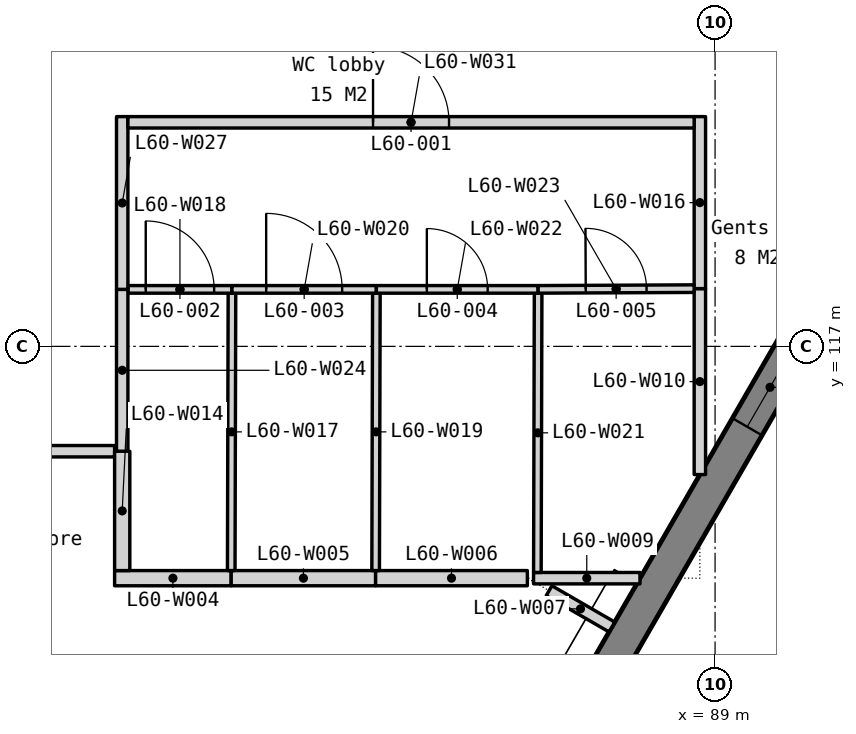
"""IFC4 building model, lengths in metres.
Left out: names, types, materials, properties, quantities, classifications, styles, units other than length and angle.
Written with IfcOpenShell. Run it as: python <this file> out.ifc"""

import sys

from ifc_helpers import new_model, si_unit, direction, frame, frame_2d, origin, place, context, subcontext, project, spatial, polyline, rectangle, outline, extrude, element, fill, save


model = new_model("IFC4")
c1 = context("Model", 3, precision=1e-05, world=origin(), true_north=direction((0.0, 1.0)))
c2 = subcontext(c1, "Body", "Model", "MODEL_VIEW")
j1 = project(units=[si_unit("LENGTHUNIT", "METRE"), si_unit("PLANEANGLEUNIT", "RADIAN")], contexts=[c1])
p1 = place(None, origin())
s1 = spatial("IfcSite", under=j1, at=p1, CompositionType="ELEMENT")
p2 = place(p1, origin())
s2 = spatial("IfcBuilding", under=s1, at=p2, CompositionType="ELEMENT")
p3 = place(p2, frame((0.0, 0.0, 246.5)))
s3 = spatial("IfcBuildingStorey", under=s2, at=p3, CompositionType="ELEMENT", Elevation=246.5)
p4 = place(p3, frame((80.905, 101.188, -0.15), z_axis=(0.0, 0.0, 1.0), x_axis=(0.500002536638, 0.866023939251, 0.0)))
e1 = element("IfcWall", 1, at=p4, inside=s3, PredefinedType="SOLIDWALL", context=c2, shape_type="SweptSolid", body=[
    extrude(outline(polyline([(36.972, 0.0), (36.972, 3.9), (0.0, 3.9), (0.0, 0.0), (36.972, 0.0)])), frame((0.0, 0.225, 0.0), z_axis=(0.0, -1.0, 0.0), x_axis=(1.0, 0.0, 0.0)), (0.0, 0.0, 1.0), 0.45),
])
p5 = place(p4, frame((0.744, 0.0, 0.95)))
e2 = element("IfcOpeningElement", 2, at=p5, cuts=e1, PredefinedType="OPENING", context=c2, shape_type="SweptSolid", body=[
    extrude(rectangle(XDim=1.2, YDim=2.2, at=frame_2d((0.6, 1.1))), frame((0.0, 0.235, 0.0), z_axis=(0.0, -1.0, 0.0), x_axis=(1.0, 0.0, 0.0)), (0.0, 0.0, 1.0), 0.47),
])
p6 = place(p4, frame((7.793, 0.0, 0.95)))
e3 = element("IfcOpeningElement", 3, at=p6, cuts=e1, PredefinedType="OPENING", context=c2, shape_type="SweptSolid", body=[
    extrude(rectangle(XDim=1.2, YDim=2.2, at=frame_2d((0.6, 1.1))), frame((0.0, 0.235, 0.0), z_axis=(0.0, -1.0, 0.0), x_axis=(1.0, 0.0, 0.0)), (0.0, 0.0, 1.0), 0.47),
])
p7 = place(p4, frame((9.493, 0.0, 0.95)))
e4 = element("IfcOpeningElement", 4, at=p7, cuts=e1, PredefinedType="OPENING", context=c2, shape_type="SweptSolid", body=[
    extrude(rectangle(XDim=1.2, YDim=2.2, at=frame_2d((0.6, 1.1))), frame((0.0, 0.235, 0.0), z_axis=(0.0, -1.0, 0.0), x_axis=(1.0, 0.0, 0.0)), (0.0, 0.0, 1.0), 0.47),
])
p8 = place(p4, frame((17.036, 0.0, 0.95)))
e5 = element("IfcOpeningElement", 5, at=p8, cuts=e1, PredefinedType="OPENING", context=c2, shape_type="SweptSolid", body=[
    extrude(rectangle(XDim=1.2, YDim=2.2, at=frame_2d((0.6, 1.1))), frame((0.0, 0.235, 0.0), z_axis=(0.0, -1.0, 0.0), x_axis=(1.0, 0.0, 0.0)), (0.0, 0.0, 1.0), 0.47),
])
p9 = place(p4, frame((18.736, 0.0, 0.95)))
e6 = element("IfcOpeningElement", 6, at=p9, cuts=e1, PredefinedType="OPENING", context=c2, shape_type="SweptSolid", body=[
    extrude(rectangle(XDim=1.2, YDim=2.2, at=frame_2d((0.6, 1.1))), frame((0.0, 0.235, 0.0), z_axis=(0.0, -1.0, 0.0), x_axis=(1.0, 0.0, 0.0)), (0.0, 0.0, 1.0), 0.47),
])
p10 = place(p4, frame((26.279, 0.0, 0.95)))
e7 = element("IfcOpeningElement", 7, at=p10, cuts=e1, PredefinedType="OPENING", context=c2, shape_type="SweptSolid", body=[
    extrude(rectangle(XDim=1.2, YDim=2.2, at=frame_2d((0.6, 1.1))), frame((0.0, 0.235, 0.0), z_axis=(0.0, -1.0, 0.0), x_axis=(1.0, 0.0, 0.0)), (0.0, 0.0, 1.0), 0.47),
])
p11 = place(p4, frame((27.979, 0.0, 0.95)))
e8 = element("IfcOpeningElement", 8, at=p11, cuts=e1, PredefinedType="OPENING", context=c2, shape_type="SweptSolid", body=[
    extrude(rectangle(XDim=1.2, YDim=2.2, at=frame_2d((0.6, 1.1))), frame((0.0, 0.235, 0.0), z_axis=(0.0, -1.0, 0.0), x_axis=(1.0, 0.0, 0.0)), (0.0, 0.0, 1.0), 0.47),
])
p12 = place(p4, frame((35.028, 0.0, 0.95)))
e9 = element("IfcOpeningElement", 9, at=p12, cuts=e1, PredefinedType="OPENING", context=c2, shape_type="SweptSolid", body=[
    extrude(rectangle(XDim=1.2, YDim=2.2, at=frame_2d((0.6, 1.1))), frame((0.0, 0.235, 0.0), z_axis=(0.0, -1.0, 0.0), x_axis=(1.0, 0.0, 0.0)), (0.0, 0.0, 1.0), 0.47),
])
p13 = place(p3, frame((81.1, 113.95, 0.0), z_axis=(0.0, 0.0, 1.0), x_axis=(1.0, 0.0, 0.0)))
e10 = element("IfcWall", 10, at=p13, inside=s3, PredefinedType="PARTITIONING", context=c2, shape_type="SweptSolid", body=[
    extrude(rectangle(XDim=1.534, YDim=0.2, at=frame_2d((0.767, 0.0))), origin(), (0.0, 0.0, 1.0), 3.75),
])
p14 = place(p3, frame((82.634, 113.95, 0.0), z_axis=(0.0, 0.0, 1.0), x_axis=(1.0, 0.0, 0.0)))
e11 = element("IfcWall", 11, at=p14, inside=s3, PredefinedType="PARTITIONING", context=c2, shape_type="SweptSolid", body=[
    extrude(rectangle(XDim=1.9, YDim=0.2, at=frame_2d((0.95, 0.0))), origin(), (0.0, 0.0, 1.0), 3.75),
])
p15 = place(p3, frame((84.534, 113.95, 0.0), z_axis=(0.0, 0.0, 1.0), x_axis=(1.0, 0.0, 0.0)))
e12 = element("IfcWall", 12, at=p15, inside=s3, PredefinedType="PARTITIONING", context=c2, shape_type="SweptSolid", body=[
    extrude(rectangle(XDim=1.997, YDim=0.2, at=frame_2d((0.998, 0.0))), origin(), (0.0, 0.0, 1.0), 3.75),
])
p16 = place(p3, frame((86.816, 113.785, 0.0), z_axis=(0.0, 0.0, 1.0), x_axis=(0.865951249342, -0.500128417272, 0.0)))
e13 = element("IfcWall", 13, at=p16, inside=s3, PredefinedType="PARTITIONING", context=c2, shape_type="SweptSolid", body=[
    extrude(rectangle(XDim=0.954, YDim=0.15, at=frame_2d((0.477, 0.0))), origin(), (0.0, 0.0, 1.0), 3.75),
])
p17 = place(p3, frame((86.612, 113.95, 0.0), z_axis=(0.0, 0.0, 1.0), x_axis=(1.0, 0.0, 0.0)))
e14 = element("IfcWall", 14, at=p17, inside=s3, PredefinedType="PARTITIONING", context=c2, shape_type="SweptSolid", body=[
    extrude(rectangle(XDim=1.4, YDim=0.15, at=frame_2d((0.7, 0.0))), origin(), (0.0, 0.0, 1.0), 3.75),
])
p18 = place(p3, frame((88.8, 115.313, 0.0), z_axis=(0.0, 0.0, 1.0), x_axis=(0.0, 1.0, 0.0)))
e15 = element("IfcWall", 15, at=p18, inside=s3, PredefinedType="PARTITIONING", context=c2, shape_type="SweptSolid", body=[
    extrude(rectangle(XDim=2.447, YDim=0.15, at=frame_2d((1.223, 0.0))), origin(), (0.0, 0.0, 1.0), 3.062),
])
p19 = place(p3, frame((76.363, 115.62, 0.0), z_axis=(0.0, 0.0, 1.0), x_axis=(1.0, 0.0, 0.0)))
e16 = element("IfcWall", 16, at=p19, inside=s3, PredefinedType="PARTITIONING", context=c2, shape_type="SweptSolid", body=[
    extrude(rectangle(XDim=4.737, YDim=0.15, at=frame_2d((2.369, 0.0))), origin(), (0.0, 0.0, 1.0), 3.75),
])
p20 = place(p19, frame((1.469, 0.0, 0.0)))
e17 = element("IfcOpeningElement", 17, at=p20, cuts=e16, PredefinedType="OPENING", context=c2, shape_type="SweptSolid", body=[
    extrude(rectangle(XDim=1.8, YDim=2.1, at=frame_2d((0.9, 1.05))), frame((0.0, 0.085, 0.0), z_axis=(0.0, -1.0, 0.0), x_axis=(1.0, 0.0, 0.0)), (0.0, 0.0, 1.0), 0.17),
])
p21 = place(p3, frame((81.2, 114.05, 0.0), z_axis=(0.0, 0.0, 1.0), x_axis=(0.0, 1.0, 0.0)))
e18 = element("IfcWall", 18, at=p21, inside=s3, PredefinedType="PARTITIONING", context=c2, shape_type="SweptSolid", body=[
    extrude(rectangle(XDim=1.57, YDim=0.2, at=frame_2d((0.785, 0.0))), origin(), (0.0, 0.0, 1.0), 3.75),
])
p22 = place(p3, frame((88.8, 117.76, 0.0), z_axis=(0.0, 0.0, 1.0), x_axis=(0.0, 1.0, 0.0)))
e19 = element("IfcWall", 19, at=p22, inside=s3, PredefinedType="PARTITIONING", context=c2, shape_type="SweptSolid", body=[
    extrude(rectangle(XDim=2.263, YDim=0.15, at=frame_2d((1.131, 0.0))), origin(), (0.0, 0.0, 1.0), 3.062),
])
p23 = place(p3, frame((82.634, 114.05, 0.0), z_axis=(0.0, 0.0, 1.0), x_axis=(0.002608686776, 0.999996597371, 0.0)))
e20 = element("IfcWall", 20, at=p23, inside=s3, PredefinedType="PARTITIONING", context=c2, shape_type="SweptSolid", body=[
    extrude(rectangle(XDim=3.65, YDim=0.1, at=frame_2d((1.825, 0.0))), origin(), (0.0, 0.0, 1.0), 3.75),
])
p24 = place(p3, frame((81.275, 117.75, 0.0), z_axis=(0.0, 0.0, 1.0), x_axis=(1.0, 0.0, 0.0)))
e21 = element("IfcWall", 21, at=p24, inside=s3, PredefinedType="PARTITIONING", context=c2, shape_type="SweptSolid", body=[
    extrude(rectangle(XDim=1.369, YDim=0.1, at=frame_2d((0.685, 0.0))), origin(), (0.0, 0.0, 1.0), 3.75),
])
p25 = place(p24, frame((0.235, 0.0, 0.0)))
e22 = element("IfcOpeningElement", 22, at=p25, cuts=e21, PredefinedType="OPENING", context=c2, shape_type="SweptSolid", body=[
    extrude(rectangle(XDim=0.9, YDim=2.1, at=frame_2d((0.45, 1.05))), frame((0.0, 0.06, 0.0), z_axis=(0.0, -1.0, 0.0), x_axis=(1.0, 0.0, 0.0)), (0.0, 0.0, 1.0), 0.12),
])
p26 = place(p3, frame((84.534, 114.05, 0.0), z_axis=(0.0, 0.0, 1.0), x_axis=(0.002675575707, 0.999996420641, 0.0)))
e23 = element("IfcWall", 23, at=p26, inside=s3, PredefinedType="PARTITIONING", context=c2, shape_type="SweptSolid", body=[
    extrude(rectangle(XDim=3.65, YDim=0.1, at=frame_2d((1.825, 0.0))), origin(), (0.0, 0.0, 1.0), 3.75),
])
p27 = place(p3, frame((82.644, 117.75, 0.0), z_axis=(0.0, 0.0, 1.0), x_axis=(1.0, 0.0, 0.0)))
e24 = element("IfcWall", 24, at=p27, inside=s3, PredefinedType="PARTITIONING", context=c2, shape_type="SweptSolid", body=[
    extrude(rectangle(XDim=1.9, YDim=0.1, at=frame_2d((0.95, 0.0))), origin(), (0.0, 0.0, 1.0), 3.75),
])
p28 = place(p27, frame((0.45, 0.0, 0.0)))
e25 = element("IfcOpeningElement", 25, at=p28, cuts=e24, PredefinedType="OPENING", context=c2, shape_type="SweptSolid", body=[
    extrude(rectangle(XDim=1.0, YDim=2.1, at=frame_2d((0.5, 1.05))), frame((0.0, 0.06, 0.0), z_axis=(0.0, -1.0, 0.0), x_axis=(1.0, 0.0, 0.0)), (0.0, 0.0, 1.0), 0.12),
])
p29 = place(p3, frame((86.662, 114.025, 0.0), z_axis=(0.0, 0.0, 1.0), x_axis=(0.002657268237, 0.999996469457, 0.0)))
e26 = element("IfcWall", 26, at=p29, inside=s3, PredefinedType="PARTITIONING", context=c2, shape_type="SweptSolid", body=[
    extrude(rectangle(XDim=3.675, YDim=0.1, at=frame_2d((1.837, 0.0))), origin(), (0.0, 0.0, 1.0), 3.75),
])
p30 = place(p3, frame((84.544, 117.75, 0.0), z_axis=(0.0, 0.0, 1.0), x_axis=(1.0, 0.0, 0.0)))
e27 = element("IfcWall", 27, at=p30, inside=s3, PredefinedType="PARTITIONING", context=c2, shape_type="SweptSolid", body=[
    extrude(rectangle(XDim=2.128, YDim=0.1, at=frame_2d((1.064, 0.0))), origin(), (0.0, 0.0, 1.0), 3.75),
])
p31 = place(p30, frame((0.664, 0.0, 0.0)))
e28 = element("IfcOpeningElement", 28, at=p31, cuts=e27, PredefinedType="OPENING", context=c2, shape_type="SweptSolid", body=[
    extrude(rectangle(XDim=0.8, YDim=2.1, at=frame_2d((0.4, 1.05))), frame((0.0, 0.06, 0.0), z_axis=(0.0, -1.0, 0.0), x_axis=(1.0, 0.0, 0.0)), (0.0, 0.0, 1.0), 0.12),
])
p32 = place(p3, frame((86.672, 117.75, 0.0), z_axis=(0.0, 0.0, 1.0), x_axis=(0.99998868658, 0.004756754366, 0.0)))
e29 = element("IfcWall", 29, at=p32, inside=s3, PredefinedType="PARTITIONING", context=c2, shape_type="SweptSolid", body=[
    extrude(rectangle(XDim=2.053, YDim=0.1, at=frame_2d((1.026, 0.0))), origin(), (0.0, 0.0, 1.0), 3.75),
])
p33 = place(p32, frame((0.626, 0.0, 0.0)))
e30 = element("IfcOpeningElement", 30, at=p33, cuts=e29, PredefinedType="OPENING", context=c2, shape_type="SweptSolid", body=[
    extrude(rectangle(XDim=0.8, YDim=2.1, at=frame_2d((0.4, 1.05))), frame((0.0, 0.06, 0.0), z_axis=(0.0, -1.0, 0.0), x_axis=(1.0, 0.0, 0.0)), (0.0, 0.0, 1.0), 0.12),
])
p34 = place(p3, frame((81.2, 115.62, 0.0), z_axis=(0.0, 0.0, 1.0), x_axis=(0.0, 1.0, 0.0)))
e31 = element("IfcWall", 31, at=p34, inside=s3, PredefinedType="PARTITIONING", context=c2, shape_type="SweptSolid", body=[
    extrude(rectangle(XDim=2.13, YDim=0.15, at=frame_2d((1.065, 0.0))), origin(), (0.0, 0.0, 1.0), 3.75),
])
p35 = place(p3, frame((81.2, 117.75, 0.0), z_axis=(0.0, 0.0, 1.0), x_axis=(0.0, 1.0, 0.0)))
e32 = element("IfcWall", 32, at=p35, inside=s3, PredefinedType="PARTITIONING", context=c2, shape_type="SweptSolid", body=[
    extrude(rectangle(XDim=2.273, YDim=0.15, at=frame_2d((1.136, 0.0))), origin(), (0.0, 0.0, 1.0), 3.75),
])
p36 = place(p3, frame((81.275, 119.948, 0.0), z_axis=(0.0, 0.0, 1.0), x_axis=(1.0, 0.0, 0.0)))
e33 = element("IfcWall", 33, at=p36, inside=s3, PredefinedType="PARTITIONING", context=c2, shape_type="SweptSolid", body=[
    extrude(rectangle(XDim=7.45, YDim=0.15, at=frame_2d((3.725, 0.0))), origin(), (0.0, 0.0, 1.0), 3.75),
])
p37 = place(p36, frame((3.225, 0.0, 0.0)))
e34 = element("IfcOpeningElement", 34, at=p37, cuts=e33, PredefinedType="OPENING", context=c2, shape_type="SweptSolid", body=[
    extrude(rectangle(XDim=1.0, YDim=2.1, at=frame_2d((0.5, 1.05))), frame((0.0, 0.085, 0.0), z_axis=(0.0, -1.0, 0.0), x_axis=(1.0, 0.0, 0.0)), (0.0, 0.0, 1.0), 0.17),
])
p38 = place(p8, origin())
e35 = element("IfcWindow", 35, at=p38, inside=s3, PartitioningType="SINGLE_PANEL", PredefinedType="WINDOW", context=c2, shape_type="SweptSolid", body=[
    extrude(rectangle(XDim=1.2, YDim=2.2, at=frame_2d((0.6, 1.1))), frame((0.0, 0.03, 0.0), z_axis=(0.0, -1.0, 0.0), x_axis=(1.0, 0.0, 0.0)), (0.0, 0.0, 1.0), 0.06),
])
fill(e5, e35)
p39 = place(p37, origin())
e36 = element("IfcDoor", 36, at=p39, inside=s3, OperationType="SINGLE_SWING_LEFT", PredefinedType="DOOR", context=c2, shape_type="SweptSolid", body=[
    extrude(rectangle(XDim=1.0, YDim=2.1, at=frame_2d((0.5, 1.05))), frame((0.0, 0.025, 0.0), z_axis=(0.0, -1.0, 0.0), x_axis=(1.0, 0.0, 0.0)), (0.0, 0.0, 1.0), 0.05),
])
fill(e34, e36)
p40 = place(p25, origin())
e37 = element("IfcDoor", 37, at=p40, inside=s3, OperationType="SINGLE_SWING_LEFT", PredefinedType="DOOR", context=c2, shape_type="SweptSolid", body=[
    extrude(rectangle(XDim=0.9, YDim=2.1, at=frame_2d((0.45, 1.05))), frame((0.0, 0.025, 0.0), z_axis=(0.0, -1.0, 0.0), x_axis=(1.0, 0.0, 0.0)), (0.0, 0.0, 1.0), 0.05),
])
fill(e22, e37)
p41 = place(p28, origin())
e38 = element("IfcDoor", 38, at=p41, inside=s3, OperationType="SINGLE_SWING_LEFT", PredefinedType="DOOR", context=c2, shape_type="SweptSolid", body=[
    extrude(rectangle(XDim=1.0, YDim=2.1, at=frame_2d((0.5, 1.05))), frame((0.0, 0.025, 0.0), z_axis=(0.0, -1.0, 0.0), x_axis=(1.0, 0.0, 0.0)), (0.0, 0.0, 1.0), 0.05),
])
fill(e25, e38)
p42 = place(p31, origin())
e39 = element("IfcDoor", 39, at=p42, inside=s3, OperationType="SINGLE_SWING_LEFT", PredefinedType="DOOR", context=c2, shape_type="SweptSolid", body=[
    extrude(rectangle(XDim=0.8, YDim=2.1, at=frame_2d((0.4, 1.05))), frame((0.0, 0.025, 0.0), z_axis=(0.0, -1.0, 0.0), x_axis=(1.0, 0.0, 0.0)), (0.0, 0.0, 1.0), 0.05),
])
fill(e28, e39)
p43 = place(p33, origin())
e40 = element("IfcDoor", 40, at=p43, inside=s3, OperationType="SINGLE_SWING_LEFT", PredefinedType="DOOR", context=c2, shape_type="SweptSolid", body=[
    extrude(rectangle(XDim=0.8, YDim=2.1, at=frame_2d((0.4, 1.05))), frame((0.0, 0.025, 0.0), z_axis=(0.0, -1.0, 0.0), x_axis=(1.0, 0.0, 0.0)), (0.0, 0.0, 1.0), 0.05),
])
fill(e30, e40)
save(model, sys.argv[1])
